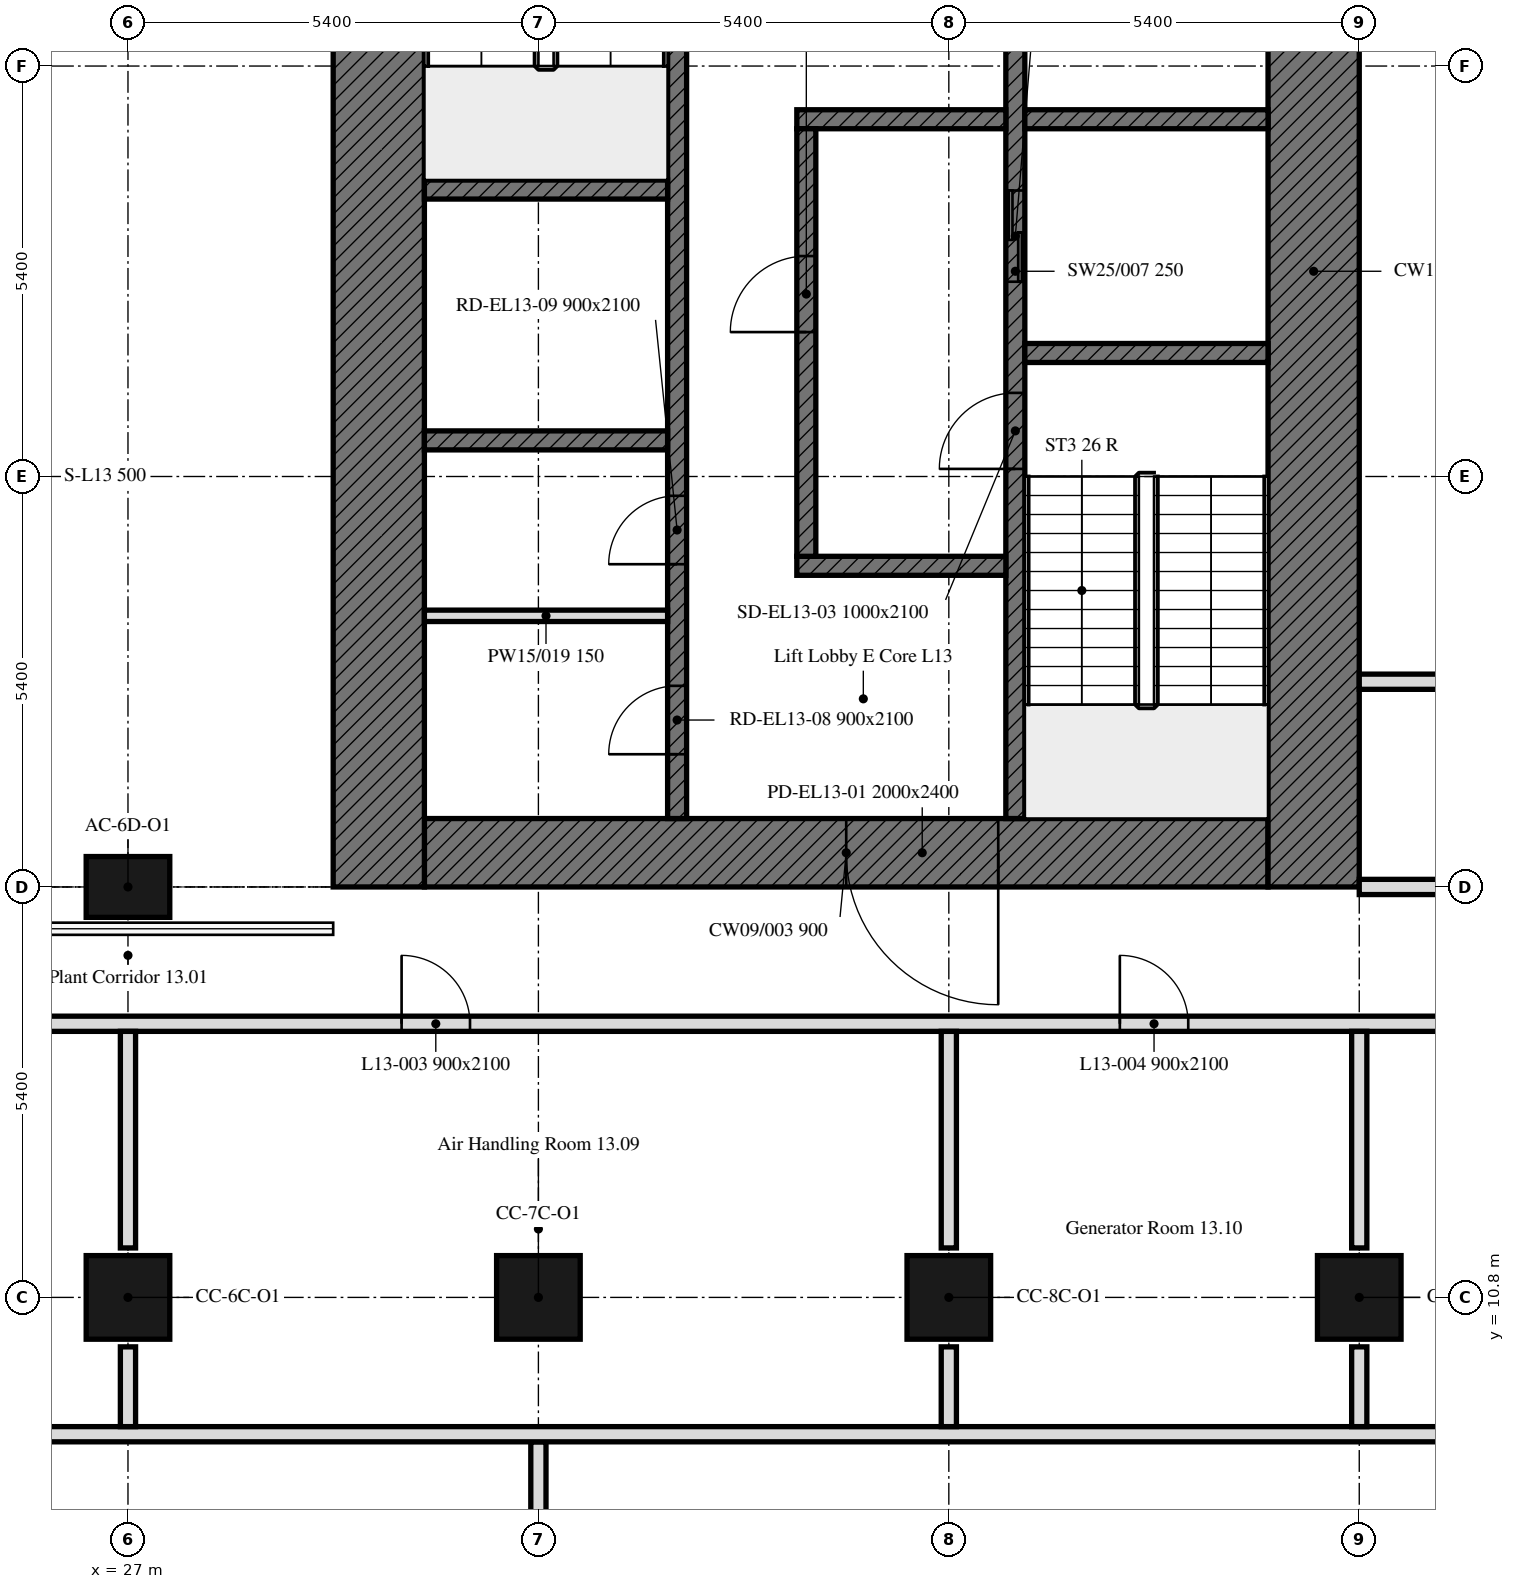
"""IFC4 building model, lengths in metres.
Left out: names, types, materials, properties, quantities, classifications, styles, units other than length and angle.
Written with IfcOpenShell. Run it as: python <this file> out.ifc"""

import sys

from ifc_helpers import new_model, si_unit, direction, frame, frame_2d, origin, origin_2d, place, context, subcontext, project, spatial, rectangle, extrude, element, fill, save


model = new_model("IFC4")
c1 = context("Model", 3, precision=1e-05, world=origin(), true_north=direction((0.0, 1.0)))
c2 = subcontext(c1, "Body", "Model", "MODEL_VIEW")
j1 = project(units=[si_unit("LENGTHUNIT", "METRE"), si_unit("PLANEANGLEUNIT", "RADIAN")], contexts=[c1])
p1 = place(None, origin())
s1 = spatial("IfcSite", under=j1, at=p1, CompositionType="ELEMENT")
p2 = place(p1, origin())
s2 = spatial("IfcBuilding", under=s1, at=p2, CompositionType="ELEMENT")
p3 = place(p2, frame((0.0, 0.0, 60.2)))
s3 = spatial("IfcBuildingStorey", under=s2, at=p3, CompositionType="ELEMENT", Elevation=60.2)
for number, where, z_axis, x_axis in (
    (1, (27.0, 10.8, 0.0), (0.0, 0.0, 1.0), (1.0, 0.0, 0.0)),
    (2, (32.4, 10.8, 0.0), (0.0, 0.0, 1.0), (1.0, 0.0, 0.0)),
    (3, (37.8, 10.8, 0.0), (0.0, 0.0, 1.0), (1.0, 0.0, 0.0)),
    (4, (43.2, 10.8, 0.0), (0.0, 0.0, 1.0), (1.0, 0.0, 0.0)),
):
    element("IfcColumn", number, at=place(p3, frame(where, z_axis=z_axis, x_axis=x_axis)), inside=s3, PredefinedType="COLUMN", context=c2, shape_type="SweptSolid", body=[
        extrude(rectangle(XDim=1.1, YDim=1.1, at=origin_2d()), origin(), (0.0, 0.0, 1.0), 4.5),
    ])
p4 = place(p3, frame((27.0, 16.2, 0.0), z_axis=(0.0, 0.0, 1.0), x_axis=(1.0, 0.0, 0.0)))
e5 = element("IfcColumn", 5, at=p4, inside=s3, PredefinedType="COLUMN", context=c2, shape_type="SweptSolid", body=[
    extrude(rectangle(XDim=1.1, YDim=0.8, at=origin_2d()), origin(), (0.0, 0.0, 1.0), 4.5),
])
p5 = place(p3, frame((42.0, 16.65, 0.0), z_axis=(0.0, 0.0, 1.0), x_axis=(-1.0, 0.0, 0.0)))
e6 = element("IfcWall", 6, at=p5, inside=s3, PredefinedType="SOLIDWALL", context=c2, shape_type="SweptSolid", body=[
    extrude(rectangle(XDim=11.1, YDim=0.9, at=frame_2d((5.55, 0.0))), origin(), (0.0, 0.0, 1.0), 4.5),
])
p6 = place(p5, frame((3.55, 0.0, 0.0)))
e7 = element("IfcOpeningElement", 7, at=p6, cuts=e6, PredefinedType="OPENING", context=c2, shape_type="SweptSolid", body=[
    extrude(rectangle(XDim=2.0, YDim=2.4, at=frame_2d((1.0, 1.2))), frame((0.0, 0.45, 0.0), z_axis=(0.0, -1.0, 0.0), x_axis=(1.0, 0.0, 0.0)), (0.0, 0.0, 1.0), 0.9),
])
for number, where, z_axis, x_axis in (
    (8, (42.6, 32.4, 0.0), (0.0, 0.0, 1.0), (0.0, -1.0, 0.0)),
    (9, (30.3, 16.2, 0.0), (0.0, 0.0, 1.0), (0.0, 1.0, 0.0)),
):
    element("IfcWall", number, at=place(p3, frame(where, z_axis=z_axis, x_axis=x_axis)), inside=s3, PredefinedType="SOLIDWALL", context=c2, shape_type="SweptSolid", body=[
        extrude(rectangle(XDim=16.2, YDim=1.2, at=frame_2d((8.1, 0.0))), origin(), (0.0, 0.0, 1.0), 4.5),
    ])
p7 = place(p3, frame((38.675, 17.1, 0.0), z_axis=(0.0, 0.0, 1.0), x_axis=(0.0, 1.0, 0.0)))
e10 = element("IfcWall", 10, at=p7, inside=s3, PredefinedType="SOLIDWALL", context=c2, shape_type="SweptSolid", body=[
    extrude(rectangle(XDim=14.4, YDim=0.25, at=frame_2d((7.2, 0.0))), origin(), (0.0, 0.0, 1.0), 4.5),
])
p8 = place(p7, frame((4.6, 0.0, 0.0)))
e11 = element("IfcOpeningElement", 11, at=p8, cuts=e10, PredefinedType="OPENING", context=c2, shape_type="SweptSolid", body=[
    extrude(rectangle(XDim=1.0, YDim=2.1, at=frame_2d((0.5, 1.05))), frame((0.0, 0.125, 0.0), z_axis=(0.0, -1.0, 0.0), x_axis=(1.0, 0.0, 0.0)), (0.0, 0.0, 1.0), 0.25),
])
p9 = place(p7, frame((7.062, 0.0, 0.0)))
e12 = element("IfcOpeningElement", 12, at=p9, cuts=e10, PredefinedType="OPENING", context=c2, shape_type="SweptSolid", body=[
    extrude(rectangle(XDim=1.2, YDim=2.1, at=frame_2d((0.6, 1.05))), frame((0.0, 0.125, 0.0), z_axis=(0.0, -1.0, 0.0), x_axis=(1.0, 0.0, 0.0)), (0.0, 0.0, 1.0), 0.25),
])
p10 = place(p3, frame((34.225, 17.1, 0.0), z_axis=(0.0, 0.0, 1.0), x_axis=(0.0, 1.0, 0.0)))
e13 = element("IfcWall", 13, at=p10, inside=s3, PredefinedType="SOLIDWALL", context=c2, shape_type="SweptSolid", body=[
    extrude(rectangle(XDim=14.4, YDim=0.25, at=frame_2d((7.2, 0.0))), origin(), (0.0, 0.0, 1.0), 4.5),
])
p11 = place(p10, frame((13.15, 0.0, 0.0)))
e14 = element("IfcOpeningElement", 14, at=p11, cuts=e13, PredefinedType="OPENING", context=c2, shape_type="SweptSolid", body=[
    extrude(rectangle(XDim=1.0, YDim=2.1, at=frame_2d((0.5, 1.05))), frame((0.0, 0.125, 0.0), z_axis=(0.0, -1.0, 0.0), x_axis=(1.0, 0.0, 0.0)), (0.0, 0.0, 1.0), 0.25),
])
p12 = place(p10, frame((0.846, 0.0, 0.0)))
e15 = element("IfcOpeningElement", 15, at=p12, cuts=e13, PredefinedType="OPENING", context=c2, shape_type="SweptSolid", body=[
    extrude(rectangle(XDim=0.9, YDim=2.1, at=frame_2d((0.45, 1.05))), frame((0.0, 0.125, 0.0), z_axis=(0.0, -1.0, 0.0), x_axis=(1.0, 0.0, 0.0)), (0.0, 0.0, 1.0), 0.25),
])
p13 = place(p10, frame((3.346, 0.0, 0.0)))
e16 = element("IfcOpeningElement", 16, at=p13, cuts=e13, PredefinedType="OPENING", context=c2, shape_type="SweptSolid", body=[
    extrude(rectangle(XDim=0.9, YDim=2.1, at=frame_2d((0.45, 1.05))), frame((0.0, 0.125, 0.0), z_axis=(0.0, -1.0, 0.0), x_axis=(1.0, 0.0, 0.0)), (0.0, 0.0, 1.0), 0.25),
])
p14 = place(p3, frame((38.8, 23.225, 0.0), z_axis=(0.0, 0.0, 1.0), x_axis=(1.0, 0.0, 0.0)))
e17 = element("IfcWall", 17, at=p14, inside=s3, PredefinedType="SOLIDWALL", context=c2, shape_type="SweptSolid", body=[
    extrude(rectangle(XDim=3.2, YDim=0.25, at=frame_2d((1.6, 0.0))), origin(), (0.0, 0.0, 1.0), 4.5),
])
for number, where, z_axis, x_axis in (
    (18, (30.9, 25.375, 0.0), (0.0, 0.0, 1.0), (1.0, 0.0, 0.0)),
    (19, (30.9, 22.075, 0.0), (0.0, 0.0, 1.0), (1.0, 0.0, 0.0)),
):
    element("IfcWall", number, at=place(p3, frame(where, z_axis=z_axis, x_axis=x_axis)), inside=s3, PredefinedType="SOLIDWALL", context=c2, shape_type="SweptSolid", body=[
        extrude(rectangle(XDim=3.2, YDim=0.25, at=frame_2d((1.6, 0.0))), origin(), (0.0, 0.0, 1.0), 4.5),
    ])
p15 = place(p3, frame((38.8, 26.3, 0.0), z_axis=(0.0, 0.0, 1.0), x_axis=(1.0, 0.0, 0.0)))
e20 = element("IfcWall", 20, at=p15, inside=s3, PredefinedType="SOLIDWALL", context=c2, shape_type="SweptSolid", body=[
    extrude(rectangle(XDim=3.2, YDim=0.25, at=frame_2d((1.6, 0.0))), origin(), (0.0, 0.0, 1.0), 4.5),
])
for number, where, z_axis, x_axis in (
    (21, (35.8, 26.3, 0.0), (0.0, 0.0, 1.0), (1.0, 0.0, 0.0)),
    (22, (35.8, 20.425, 0.0), (0.0, 0.0, 1.0), (1.0, 0.0, 0.0)),
):
    element("IfcWall", number, at=place(p3, frame(where, z_axis=z_axis, x_axis=x_axis)), inside=s3, PredefinedType="SOLIDWALL", context=c2, shape_type="SweptSolid", body=[
        extrude(rectangle(XDim=2.75, YDim=0.25, at=frame_2d((1.375, 0.0))), origin(), (0.0, 0.0, 1.0), 4.5),
    ])
p16 = place(p3, frame((35.925, 20.55, 0.0), z_axis=(0.0, 0.0, 1.0), x_axis=(0.0, 1.0, 0.0)))
e23 = element("IfcWall", 23, at=p16, inside=s3, PredefinedType="SOLIDWALL", context=c2, shape_type="SweptSolid", body=[
    extrude(rectangle(XDim=5.625, YDim=0.25, at=frame_2d((2.812, 0.0))), origin(), (0.0, 0.0, 1.0), 4.5),
])
p17 = place(p16, frame((2.95, 0.0, 0.0)))
e24 = element("IfcOpeningElement", 24, at=p17, cuts=e23, PredefinedType="OPENING", context=c2, shape_type="SweptSolid", body=[
    extrude(rectangle(XDim=1.0, YDim=2.1, at=frame_2d((0.5, 1.05))), frame((0.0, 0.125, 0.0), z_axis=(0.0, -1.0, 0.0), x_axis=(1.0, 0.0, 0.0)), (0.0, 0.0, 1.0), 0.25),
])
p18 = place(p3, frame((30.9, 19.767, 0.0), z_axis=(0.0, 0.0, 1.0), x_axis=(1.0, 0.0, 0.0)))
e25 = element("IfcWall", 25, at=p18, inside=s3, PredefinedType="PARTITIONING", context=c2, shape_type="SweptSolid", body=[
    extrude(rectangle(XDim=3.2, YDim=0.15, at=frame_2d((1.6, 0.0))), origin(), (0.0, 0.0, 1.0), 4.5),
])
p19 = place(p3, frame((48.12, 16.2, 0.0), z_axis=(0.0, 0.0, 1.0), x_axis=(-1.0, 0.0, 0.0)))
e26 = element("IfcWall", 26, at=p19, inside=s3, PredefinedType="PARTITIONING", context=c2, shape_type="SweptSolid", body=[
    extrude(rectangle(XDim=4.92, YDim=0.2, at=frame_2d((2.46, 0.0))), origin(), (0.0, 0.0, 1.0), 3.75),
])
p20 = place(p19, frame((1.77, 0.0, 0.0)))
e27 = element("IfcOpeningElement", 27, at=p20, cuts=e26, PredefinedType="OPENING", context=c2, shape_type="SweptSolid", body=[
    extrude(rectangle(XDim=0.9, YDim=2.1, at=frame_2d((0.45, 1.05))), frame((0.0, 0.1, 0.0), z_axis=(0.0, -1.0, 0.0), x_axis=(1.0, 0.0, 0.0)), (0.0, 0.0, 1.0), 0.2),
])
p21 = place(p3, frame((5.65, 14.4, 0.0), z_axis=(0.0, 0.0, 1.0), x_axis=(1.0, 0.0, 0.0)))
e28 = element("IfcWall", 28, at=p21, inside=s3, PredefinedType="PARTITIONING", context=c2, shape_type="SweptSolid", body=[
    extrude(rectangle(XDim=42.47, YDim=0.2, at=frame_2d((21.235, 0.0))), origin(), (0.0, 0.0, 1.0), 3.75),
])
p22 = place(p21, frame((3.35, 0.0, 0.0)))
e29 = element("IfcOpeningElement", 29, at=p22, cuts=e28, PredefinedType="OPENING", context=c2, shape_type="SweptSolid", body=[
    extrude(rectangle(XDim=0.9, YDim=2.1, at=frame_2d((0.45, 1.05))), frame((0.0, 0.1, 0.0), z_axis=(0.0, -1.0, 0.0), x_axis=(1.0, 0.0, 0.0)), (0.0, 0.0, 1.0), 0.2),
])
p23 = place(p21, frame((12.125, 0.0, 0.0)))
e30 = element("IfcOpeningElement", 30, at=p23, cuts=e28, PredefinedType="OPENING", context=c2, shape_type="SweptSolid", body=[
    extrude(rectangle(XDim=0.9, YDim=2.1, at=frame_2d((0.45, 1.05))), frame((0.0, 0.1, 0.0), z_axis=(0.0, -1.0, 0.0), x_axis=(1.0, 0.0, 0.0)), (0.0, 0.0, 1.0), 0.2),
])
p24 = place(p21, frame((24.95, 0.0, 0.0)))
e31 = element("IfcOpeningElement", 31, at=p24, cuts=e28, PredefinedType="OPENING", context=c2, shape_type="SweptSolid", body=[
    extrude(rectangle(XDim=0.9, YDim=2.1, at=frame_2d((0.45, 1.05))), frame((0.0, 0.1, 0.0), z_axis=(0.0, -1.0, 0.0), x_axis=(1.0, 0.0, 0.0)), (0.0, 0.0, 1.0), 0.2),
])
p25 = place(p21, frame((34.4, 0.0, 0.0)))
e32 = element("IfcOpeningElement", 32, at=p25, cuts=e28, PredefinedType="OPENING", context=c2, shape_type="SweptSolid", body=[
    extrude(rectangle(XDim=0.9, YDim=2.1, at=frame_2d((0.45, 1.05))), frame((0.0, 0.1, 0.0), z_axis=(0.0, -1.0, 0.0), x_axis=(1.0, 0.0, 0.0)), (0.0, 0.0, 1.0), 0.2),
])
p26 = place(p21, frame((39.8, 0.0, 0.0)))
e33 = element("IfcOpeningElement", 33, at=p26, cuts=e28, PredefinedType="OPENING", context=c2, shape_type="SweptSolid", body=[
    extrude(rectangle(XDim=0.9, YDim=2.1, at=frame_2d((0.45, 1.05))), frame((0.0, 0.1, 0.0), z_axis=(0.0, -1.0, 0.0), x_axis=(1.0, 0.0, 0.0)), (0.0, 0.0, 1.0), 0.2),
])
p27 = place(p21, frame((18.2, 0.0, 0.0)))
e34 = element("IfcOpeningElement", 34, at=p27, cuts=e28, PredefinedType="OPENING", context=c2, shape_type="SweptSolid", body=[
    extrude(rectangle(XDim=0.9, YDim=2.1, at=frame_2d((0.45, 1.05))), frame((0.0, 0.1, 0.0), z_axis=(0.0, -1.0, 0.0), x_axis=(1.0, 0.0, 0.0)), (0.0, 0.0, 1.0), 0.2),
])
p28 = place(p3, frame((32.4, 6.051, 0.0), z_axis=(0.0, 0.0, 1.0), x_axis=(0.0, 1.0, 0.0)))
e35 = element("IfcWall", 35, at=p28, inside=s3, PredefinedType="PARTITIONING", context=c2, shape_type="SweptSolid", body=[
    extrude(rectangle(XDim=2.849, YDim=0.2, at=frame_2d((1.425, 0.0))), origin(), (0.0, 0.0, 1.0), 3.75),
])
p29 = place(p3, frame((48.12, 9.0, 0.0), z_axis=(0.0, 0.0, 1.0), x_axis=(-1.0, 0.0, 0.0)))
e36 = element("IfcWall", 36, at=p29, inside=s3, PredefinedType="PARTITIONING", context=c2, shape_type="SweptSolid", body=[
    extrude(rectangle(XDim=42.47, YDim=0.2, at=frame_2d((21.235, 0.0))), origin(), (0.0, 0.0, 1.0), 3.75),
])
p30 = place(p29, frame((23.37, 0.0, 0.0)))
e37 = element("IfcOpeningElement", 37, at=p30, cuts=e36, PredefinedType="OPENING", context=c2, shape_type="SweptSolid", body=[
    extrude(rectangle(XDim=0.9, YDim=2.1, at=frame_2d((0.45, 1.05))), frame((0.0, 0.1, 0.0), z_axis=(0.0, -1.0, 0.0), x_axis=(1.0, 0.0, 0.0)), (0.0, 0.0, 1.0), 0.2),
])
p31 = place(p3, frame((37.8, 9.1, 0.0), z_axis=(0.0, 0.0, 1.0), x_axis=(0.0, 1.0, 0.0)))
e38 = element("IfcWall", 38, at=p31, inside=s3, PredefinedType="PARTITIONING", context=c2, shape_type="SweptSolid", body=[
    extrude(rectangle(XDim=1.049, YDim=0.2, at=frame_2d((0.525, 0.0))), origin(), (0.0, 0.0, 1.0), 3.75),
])
for number, where, z_axis, x_axis in (
    (39, (37.8, 11.451, 0.0), (0.0, 0.0, 1.0), (0.0, 1.0, 0.0)),
    (40, (27.0, 14.3, 0.0), (0.0, 0.0, 1.0), (0.0, -1.0, 0.0)),
):
    element("IfcWall", number, at=place(p3, frame(where, z_axis=z_axis, x_axis=x_axis)), inside=s3, PredefinedType="PARTITIONING", context=c2, shape_type="SweptSolid", body=[
        extrude(rectangle(XDim=2.849, YDim=0.2, at=frame_2d((1.425, 0.0))), origin(), (0.0, 0.0, 1.0), 3.75),
    ])
p32 = place(p3, frame((27.0, 10.149, 0.0), z_axis=(0.0, 0.0, 1.0), x_axis=(0.0, -1.0, 0.0)))
e41 = element("IfcWall", 41, at=p32, inside=s3, PredefinedType="PARTITIONING", context=c2, shape_type="SweptSolid", body=[
    extrude(rectangle(XDim=1.049, YDim=0.2, at=frame_2d((0.525, 0.0))), origin(), (0.0, 0.0, 1.0), 3.75),
])
p33 = place(p3, frame((43.2, 9.1, 0.0), z_axis=(0.0, 0.0, 1.0), x_axis=(0.0, 1.0, 0.0)))
e42 = element("IfcWall", 42, at=p33, inside=s3, PredefinedType="PARTITIONING", context=c2, shape_type="SweptSolid", body=[
    extrude(rectangle(XDim=1.049, YDim=0.2, at=frame_2d((0.525, 0.0))), origin(), (0.0, 0.0, 1.0), 4.5),
])
p34 = place(p3, frame((43.2, 11.451, 0.0), z_axis=(0.0, 0.0, 1.0), x_axis=(0.0, 1.0, 0.0)))
e43 = element("IfcWall", 43, at=p34, inside=s3, PredefinedType="PARTITIONING", context=c2, shape_type="SweptSolid", body=[
    extrude(rectangle(XDim=2.849, YDim=0.2, at=frame_2d((1.425, 0.0))), origin(), (0.0, 0.0, 1.0), 4.5),
])
p35 = place(p3, frame((43.2, 18.9, 0.0), z_axis=(0.0, 0.0, 1.0), x_axis=(1.0, 0.0, 0.0)))
e44 = element("IfcWall", 44, at=p35, inside=s3, PredefinedType="PARTITIONING", context=c2, shape_type="SweptSolid", body=[
    extrude(rectangle(XDim=4.92, YDim=0.2, at=frame_2d((2.46, 0.0))), origin(), (0.0, 0.0, 1.0), 4.5),
])
p36 = place(p35, frame((2.25, 0.0, 0.0)))
e45 = element("IfcOpeningElement", 45, at=p36, cuts=e44, PredefinedType="OPENING", context=c2, shape_type="SweptSolid", body=[
    extrude(rectangle(XDim=0.9, YDim=2.1, at=frame_2d((0.45, 1.05))), frame((0.0, 0.1, 0.0), z_axis=(0.0, -1.0, 0.0), x_axis=(1.0, 0.0, 0.0)), (0.0, 0.0, 1.0), 0.2),
])
p37 = place(p6, origin())
e46 = element("IfcDoor", 46, at=p37, inside=s3, OperationType="DOUBLE_DOOR_SINGLE_SWING", PredefinedType="DOOR", context=c2, shape_type="SweptSolid", body=[
    extrude(rectangle(XDim=2.0, YDim=2.4, at=frame_2d((1.0, 1.2))), frame((0.0, 0.025, 0.0), z_axis=(0.0, -1.0, 0.0), x_axis=(1.0, 0.0, 0.0)), (0.0, 0.0, 1.0), 0.05),
])
fill(e7, e46)
p38 = place(p8, origin())
e47 = element("IfcDoor", 47, at=p38, inside=s3, OperationType="SINGLE_SWING_LEFT", PredefinedType="DOOR", context=c2, shape_type="SweptSolid", body=[
    extrude(rectangle(XDim=1.0, YDim=2.1, at=frame_2d((0.5, 1.05))), frame((0.0, 0.025, 0.0), z_axis=(0.0, -1.0, 0.0), x_axis=(1.0, 0.0, 0.0)), (0.0, 0.0, 1.0), 0.05),
])
fill(e11, e47)
p39 = place(p17, origin())
e48 = element("IfcDoor", 48, at=p39, inside=s3, OperationType="SINGLE_SWING_LEFT", PredefinedType="DOOR", context=c2, shape_type="SweptSolid", body=[
    extrude(rectangle(XDim=1.0, YDim=2.1, at=frame_2d((0.5, 1.05))), frame((0.0, 0.025, 0.0), z_axis=(0.0, -1.0, 0.0), x_axis=(1.0, 0.0, 0.0)), (0.0, 0.0, 1.0), 0.05),
])
fill(e24, e48)
p40 = place(p9, origin())
e49 = element("IfcDoor", 49, at=p40, inside=s3, OperationType="DOUBLE_DOOR_SLIDING", PredefinedType="DOOR", context=c2, shape_type="SweptSolid", body=[
    extrude(rectangle(XDim=1.2, YDim=2.1, at=frame_2d((0.6, 1.05))), frame((0.0, 0.025, 0.0), z_axis=(0.0, -1.0, 0.0), x_axis=(1.0, 0.0, 0.0)), (0.0, 0.0, 1.0), 0.05),
])
fill(e12, e49)
p41 = place(p12, origin())
e50 = element("IfcDoor", 50, at=p41, inside=s3, OperationType="SINGLE_SWING_LEFT", PredefinedType="DOOR", context=c2, shape_type="SweptSolid", body=[
    extrude(rectangle(XDim=0.9, YDim=2.1, at=frame_2d((0.45, 1.05))), frame((0.0, 0.025, 0.0), z_axis=(0.0, -1.0, 0.0), x_axis=(1.0, 0.0, 0.0)), (0.0, 0.0, 1.0), 0.05),
])
fill(e15, e50)
p42 = place(p13, origin())
e51 = element("IfcDoor", 51, at=p42, inside=s3, OperationType="SINGLE_SWING_LEFT", PredefinedType="DOOR", context=c2, shape_type="SweptSolid", body=[
    extrude(rectangle(XDim=0.9, YDim=2.1, at=frame_2d((0.45, 1.05))), frame((0.0, 0.025, 0.0), z_axis=(0.0, -1.0, 0.0), x_axis=(1.0, 0.0, 0.0)), (0.0, 0.0, 1.0), 0.05),
])
fill(e16, e51)
p43 = place(p24, origin())
e52 = element("IfcDoor", 52, at=p43, inside=s3, OperationType="SINGLE_SWING_LEFT", PredefinedType="DOOR", context=c2, shape_type="SweptSolid", body=[
    extrude(rectangle(XDim=0.9, YDim=2.1, at=frame_2d((0.45, 1.05))), frame((0.0, 0.025, 0.0), z_axis=(0.0, -1.0, 0.0), x_axis=(1.0, 0.0, 0.0)), (0.0, 0.0, 1.0), 0.05),
])
fill(e31, e52)
p44 = place(p25, origin())
e53 = element("IfcDoor", 53, at=p44, inside=s3, OperationType="SINGLE_SWING_RIGHT", PredefinedType="DOOR", context=c2, shape_type="SweptSolid", body=[
    extrude(rectangle(XDim=0.9, YDim=2.1, at=frame_2d((0.45, 1.05))), frame((0.0, 0.025, 0.0), z_axis=(0.0, -1.0, 0.0), x_axis=(1.0, 0.0, 0.0)), (0.0, 0.0, 1.0), 0.05),
])
fill(e32, e53)
save(model, sys.argv[1])
